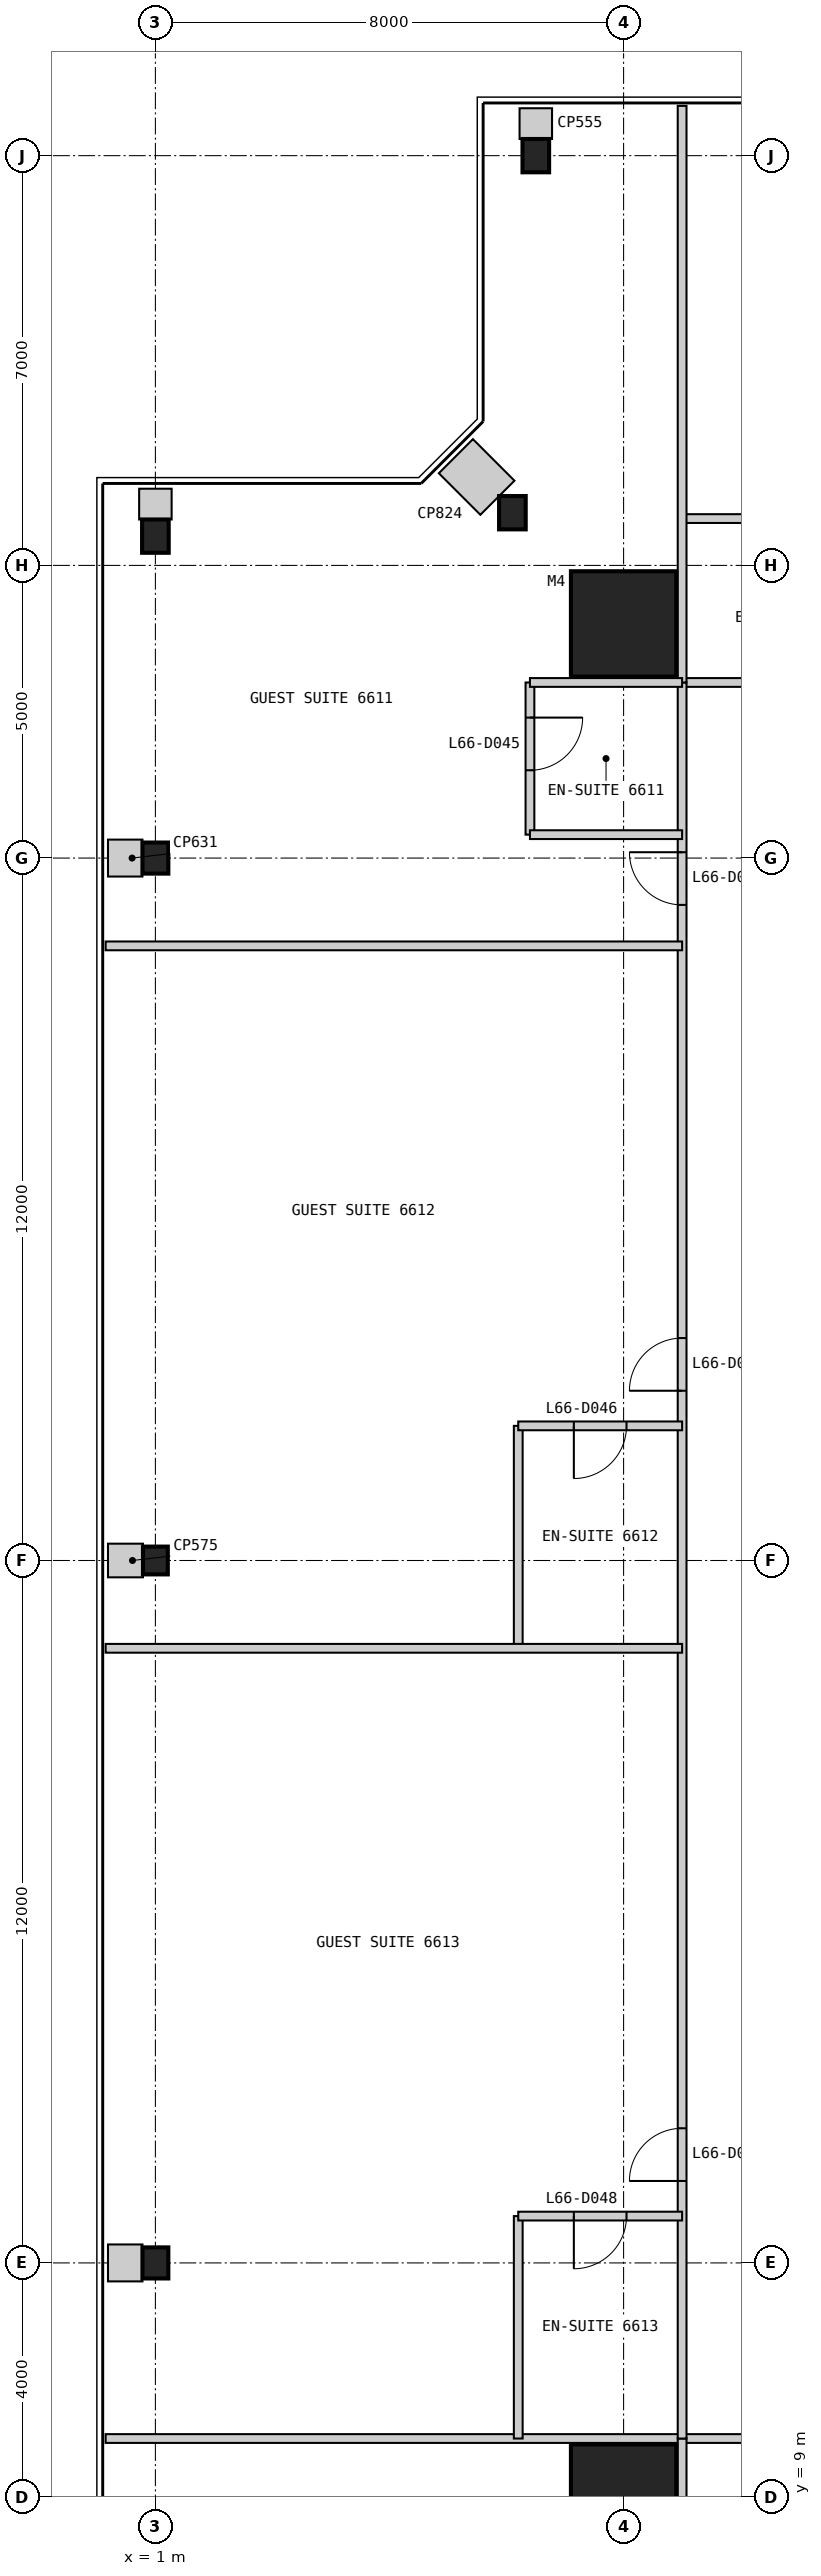
"""IFC4 building model, lengths in metres.
Left out: names, types, materials, properties, quantities, classifications, styles, units other than length and angle.
Written with IfcOpenShell. Run it as: python <this file> out.ifc"""

import sys

from ifc_helpers import new_model, si_unit, direction, frame, frame_2d, origin, origin_2d, place, context, subcontext, project, spatial, rectangle, i_section, extrude, element, fill, save


model = new_model("IFC4")
c1 = context("Model", 3, precision=1e-05, world=origin(), true_north=direction((0.0, 1.0)))
c2 = subcontext(c1, "Body", "Model", "MODEL_VIEW")
j1 = project(units=[si_unit("LENGTHUNIT", "METRE"), si_unit("PLANEANGLEUNIT", "RADIAN")], contexts=[c1])
p1 = place(None, origin())
s1 = spatial("IfcSite", under=j1, at=p1, CompositionType="ELEMENT")
p2 = place(p1, origin())
s2 = spatial("IfcBuilding", under=s1, at=p2, CompositionType="ELEMENT")
p3 = place(p2, frame((0.0, 0.0, 276.4)))
s3 = spatial("IfcBuildingStorey", under=s2, at=p3, CompositionType="ELEMENT", Elevation=276.4)
for number, where, z_axis, x_axis in (
    (1, (9.0, 9.0, 0.0), (0.0, 0.0, 1.0), (1.0, 0.0, 0.0)),
    (2, (9.0, 41.0, 0.0), (0.0, 0.0, 1.0), (1.0, 0.0, 0.0)),
):
    element("IfcColumn", number, at=place(p3, frame(where, z_axis=z_axis, x_axis=x_axis)), inside=s3, PredefinedType="COLUMN", context=c2, shape_type="SweptSolid", body=[
        extrude(rectangle(XDim=1.8, YDim=1.8, at=origin_2d()), origin(), (0.0, 0.0, 1.0), 3.4),
    ])
for number, where, z_axis, x_axis in (
    (3, (7.5, 49.0, 0.0), (0.0, 0.0, 1.0), (1.0, 0.0, 0.0)),
    (4, (7.1, 42.9, 0.0), (0.0, 0.0, 1.0), (1.0, 0.0, 0.0)),
    (5, (1.0, 42.5, 0.0), (0.0, 0.0, 1.0), (1.0, 0.0, 0.0)),
):
    element("IfcColumn", number, at=place(p3, frame(where, z_axis=z_axis, x_axis=x_axis)), inside=s3, PredefinedType="COLUMN", context=c2, shape_type="SweptSolid", body=[
        extrude(i_section(OverallWidth=0.455, OverallDepth=0.569, WebThickness=0.078, FlangeThickness=0.125, at=origin_2d()), origin(), (0.0, 0.0, 1.0), 3.4),
    ])
p4 = place(p3, frame((1.0, 37.0, 0.0), z_axis=(0.0, 0.0, 1.0), x_axis=(1.0, 0.0, 0.0)))
e6 = element("IfcColumn", 6, at=p4, inside=s3, PredefinedType="COLUMN", context=c2, shape_type="SweptSolid", body=[
    extrude(i_section(OverallWidth=0.442, OverallDepth=0.531, WebThickness=0.066, FlangeThickness=0.106, at=origin_2d()), origin(), (0.0, 0.0, 1.0), 3.4),
])
p5 = place(p3, frame((1.0, 25.0, 0.0), z_axis=(0.0, 0.0, 1.0), x_axis=(1.0, 0.0, 0.0)))
e7 = element("IfcColumn", 7, at=p5, inside=s3, PredefinedType="COLUMN", context=c2, shape_type="SweptSolid", body=[
    extrude(i_section(OverallWidth=0.424, OverallDepth=0.475, WebThickness=0.048, FlangeThickness=0.077, at=origin_2d()), origin(), (0.0, 0.0, 1.0), 3.4),
])
p6 = place(p3, frame((1.0, 13.0, 0.0), z_axis=(0.0, 0.0, 1.0), x_axis=(1.0, 0.0, 0.0)))
e8 = element("IfcColumn", 8, at=p6, inside=s3, PredefinedType="COLUMN", context=c2, shape_type="SweptSolid", body=[
    extrude(i_section(OverallWidth=0.442, OverallDepth=0.531, WebThickness=0.066, FlangeThickness=0.106, at=origin_2d()), origin(), (0.0, 0.0, 1.0), 3.4),
])
p7 = place(p3, frame((10.0, 10.0, 0.0), z_axis=(0.0, 0.0, 1.0), x_axis=(1.0, 0.0, 0.0)))
e9 = element("IfcWall", 9, at=p7, inside=s3, PredefinedType="PARTITIONING", context=c2, shape_type="SweptSolid", body=[
    extrude(rectangle(XDim=30.0, YDim=0.15, at=frame_2d((15.0, 0.0))), origin(), (0.0, 0.0, 1.0), 3.25),
])
p8 = place(p7, frame((2.9, 0.0, 0.0)))
e10 = element("IfcOpeningElement", 10, at=p8, cuts=e9, PredefinedType="OPENING", context=c2, shape_type="SweptSolid", body=[
    extrude(rectangle(XDim=0.9, YDim=2.1, at=frame_2d((0.45, 1.05))), frame((0.0, 0.085, 0.0), z_axis=(0.0, -1.0, 0.0), x_axis=(1.0, 0.0, 0.0)), (0.0, 0.0, 1.0), 0.17),
])
p9 = place(p7, frame((11.2, 0.0, 0.0)))
e11 = element("IfcOpeningElement", 11, at=p9, cuts=e9, PredefinedType="OPENING", context=c2, shape_type="SweptSolid", body=[
    extrude(rectangle(XDim=0.9, YDim=2.1, at=frame_2d((0.45, 1.05))), frame((0.0, 0.085, 0.0), z_axis=(0.0, -1.0, 0.0), x_axis=(1.0, 0.0, 0.0)), (0.0, 0.0, 1.0), 0.17),
])
p10 = place(p7, frame((17.6, 0.0, 0.0)))
e12 = element("IfcOpeningElement", 12, at=p10, cuts=e9, PredefinedType="OPENING", context=c2, shape_type="SweptSolid", body=[
    extrude(rectangle(XDim=0.9, YDim=2.1, at=frame_2d((0.45, 1.05))), frame((0.0, 0.085, 0.0), z_axis=(0.0, -1.0, 0.0), x_axis=(1.0, 0.0, 0.0)), (0.0, 0.0, 1.0), 0.17),
])
p11 = place(p7, frame((26.3, 0.0, 0.0)))
e13 = element("IfcOpeningElement", 13, at=p11, cuts=e9, PredefinedType="OPENING", context=c2, shape_type="SweptSolid", body=[
    extrude(rectangle(XDim=1.0, YDim=2.1, at=frame_2d((0.5, 1.05))), frame((0.0, 0.085, 0.0), z_axis=(0.0, -1.0, 0.0), x_axis=(1.0, 0.0, 0.0)), (0.0, 0.0, 1.0), 0.17),
])
p12 = place(p3, frame((0.15, 10.0, 0.0), z_axis=(0.0, 0.0, 1.0), x_axis=(1.0, 0.0, 0.0)))
e14 = element("IfcWall", 14, at=p12, inside=s3, PredefinedType="PARTITIONING", context=c2, shape_type="SweptSolid", body=[
    extrude(rectangle(XDim=9.85, YDim=0.15, at=frame_2d((4.925, 0.0))), origin(), (0.0, 0.0, 1.0), 3.25),
])
p13 = place(p3, frame((10.0, 7.4, 0.0), z_axis=(0.0, 0.0, 1.0), x_axis=(0.0, 1.0, 0.0)))
e15 = element("IfcWall", 15, at=p13, inside=s3, PredefinedType="PARTITIONING", context=c2, shape_type="SweptSolid", body=[
    extrude(rectangle(XDim=2.6, YDim=0.15, at=frame_2d((1.3, 0.0))), origin(), (0.0, 0.0, 1.0), 3.25),
])
p14 = place(p3, frame((40.0, 40.0, 0.0), z_axis=(0.0, 0.0, 1.0), x_axis=(-1.0, 0.0, 0.0)))
e16 = element("IfcWall", 16, at=p14, inside=s3, PredefinedType="PARTITIONING", context=c2, shape_type="SweptSolid", body=[
    extrude(rectangle(XDim=30.0, YDim=0.15, at=frame_2d((15.0, 0.0))), origin(), (0.0, 0.0, 1.0), 3.25),
])
p15 = place(p14, frame((2.9, 0.0, 0.0)))
e17 = element("IfcOpeningElement", 17, at=p15, cuts=e16, PredefinedType="OPENING", context=c2, shape_type="SweptSolid", body=[
    extrude(rectangle(XDim=0.9, YDim=2.1, at=frame_2d((0.45, 1.05))), frame((0.0, 0.085, 0.0), z_axis=(0.0, -1.0, 0.0), x_axis=(1.0, 0.0, 0.0)), (0.0, 0.0, 1.0), 0.17),
])
p16 = place(p14, frame((11.2, 0.0, 0.0)))
e18 = element("IfcOpeningElement", 18, at=p16, cuts=e16, PredefinedType="OPENING", context=c2, shape_type="SweptSolid", body=[
    extrude(rectangle(XDim=0.9, YDim=2.1, at=frame_2d((0.45, 1.05))), frame((0.0, 0.085, 0.0), z_axis=(0.0, -1.0, 0.0), x_axis=(1.0, 0.0, 0.0)), (0.0, 0.0, 1.0), 0.17),
])
p17 = place(p14, frame((24.7, 0.0, 0.0)))
e19 = element("IfcOpeningElement", 19, at=p17, cuts=e16, PredefinedType="OPENING", context=c2, shape_type="SweptSolid", body=[
    extrude(rectangle(XDim=0.9, YDim=2.1, at=frame_2d((0.45, 1.05))), frame((0.0, 0.085, 0.0), z_axis=(0.0, -1.0, 0.0), x_axis=(1.0, 0.0, 0.0)), (0.0, 0.0, 1.0), 0.17),
])
p18 = place(p3, frame((13.8, 42.8, 0.0), z_axis=(0.0, 0.0, 1.0), x_axis=(-1.0, 0.0, 0.0)))
e20 = element("IfcWall", 20, at=p18, inside=s3, PredefinedType="PARTITIONING", context=c2, shape_type="SweptSolid", body=[
    extrude(rectangle(XDim=3.8, YDim=0.15, at=frame_2d((1.9, 0.0))), origin(), (0.0, 0.0, 1.0), 3.25),
])
p19 = place(p3, frame((10.0, 40.0, 0.0), z_axis=(0.0, 0.0, 1.0), x_axis=(0.0, -1.0, 0.0)))
e21 = element("IfcWall", 21, at=p19, inside=s3, PredefinedType="PARTITIONING", context=c2, shape_type="SweptSolid", body=[
    extrude(rectangle(XDim=30.0, YDim=0.15, at=frame_2d((15.0, 0.0))), origin(), (0.0, 0.0, 1.0), 2.638),
])
p20 = place(p19, frame((2.9, 0.0, 0.0)))
e22 = element("IfcOpeningElement", 22, at=p20, cuts=e21, PredefinedType="OPENING", context=c2, shape_type="SweptSolid", body=[
    extrude(rectangle(XDim=0.9, YDim=2.1, at=frame_2d((0.45, 1.05))), frame((0.0, 0.085, 0.0), z_axis=(0.0, -1.0, 0.0), x_axis=(1.0, 0.0, 0.0)), (0.0, 0.0, 1.0), 0.17),
])
p21 = place(p19, frame((11.2, 0.0, 0.0)))
e23 = element("IfcOpeningElement", 23, at=p21, cuts=e21, PredefinedType="OPENING", context=c2, shape_type="SweptSolid", body=[
    extrude(rectangle(XDim=0.9, YDim=2.1, at=frame_2d((0.45, 1.05))), frame((0.0, 0.085, 0.0), z_axis=(0.0, -1.0, 0.0), x_axis=(1.0, 0.0, 0.0)), (0.0, 0.0, 1.0), 0.17),
])
p22 = place(p19, frame((24.7, 0.0, 0.0)))
e24 = element("IfcOpeningElement", 24, at=p22, cuts=e21, PredefinedType="OPENING", context=c2, shape_type="SweptSolid", body=[
    extrude(rectangle(XDim=0.9, YDim=2.1, at=frame_2d((0.45, 1.05))), frame((0.0, 0.085, 0.0), z_axis=(0.0, -1.0, 0.0), x_axis=(1.0, 0.0, 0.0)), (0.0, 0.0, 1.0), 0.17),
])
p23 = place(p3, frame((10.0, 49.85, 0.0), z_axis=(0.0, 0.0, 1.0), x_axis=(0.0, -1.0, 0.0)))
e25 = element("IfcWall", 25, at=p23, inside=s3, PredefinedType="PARTITIONING", context=c2, shape_type="SweptSolid", body=[
    extrude(rectangle(XDim=9.85, YDim=0.15, at=frame_2d((4.925, 0.0))), origin(), (0.0, 0.0, 1.0), 3.25),
])
p24 = place(p3, frame((7.4, 40.0, 0.0), z_axis=(0.0, 0.0, 1.0), x_axis=(0.0, -1.0, 0.0)))
e26 = element("IfcWall", 26, at=p24, inside=s3, PredefinedType="PARTITIONING", context=c2, shape_type="SweptSolid", body=[
    extrude(rectangle(XDim=2.6, YDim=0.15, at=frame_2d((1.3, 0.0))), origin(), (0.0, 0.0, 1.0), 3.25),
])
p25 = place(p24, frame((0.6, 0.0, 0.0)))
e27 = element("IfcOpeningElement", 27, at=p25, cuts=e26, PredefinedType="OPENING", context=c2, shape_type="SweptSolid", body=[
    extrude(rectangle(XDim=0.9, YDim=2.1, at=frame_2d((0.45, 1.05))), frame((0.0, 0.085, 0.0), z_axis=(0.0, -1.0, 0.0), x_axis=(1.0, 0.0, 0.0)), (0.0, 0.0, 1.0), 0.17),
])
for number, where, z_axis, x_axis in (
    (28, (7.4, 40.0, 0.0), (0.0, 0.0, 1.0), (1.0, 0.0, 0.0)),
    (29, (7.4, 37.4, 0.0), (0.0, 0.0, 1.0), (1.0, 0.0, 0.0)),
):
    element("IfcWall", number, at=place(p3, frame(where, z_axis=z_axis, x_axis=x_axis)), inside=s3, PredefinedType="PARTITIONING", context=c2, shape_type="SweptSolid", body=[
        extrude(rectangle(XDim=2.6, YDim=0.15, at=frame_2d((1.3, 0.0))), origin(), (0.0, 0.0, 1.0), 3.25),
    ])
p26 = place(p3, frame((0.15, 35.5, 0.0), z_axis=(0.0, 0.0, 1.0), x_axis=(1.0, 0.0, 0.0)))
e30 = element("IfcWall", 30, at=p26, inside=s3, PredefinedType="PARTITIONING", context=c2, shape_type="SweptSolid", body=[
    extrude(rectangle(XDim=9.85, YDim=0.15, at=frame_2d((4.925, 0.0))), origin(), (0.0, 0.0, 1.0), 3.25),
])
p27 = place(p3, frame((7.2, 27.3, 0.0), z_axis=(0.0, 0.0, 1.0), x_axis=(0.0, -1.0, 0.0)))
e31 = element("IfcWall", 31, at=p27, inside=s3, PredefinedType="PARTITIONING", context=c2, shape_type="SweptSolid", body=[
    extrude(rectangle(XDim=3.8, YDim=0.15, at=frame_2d((1.9, 0.0))), origin(), (0.0, 0.0, 1.0), 3.25),
])
p28 = place(p3, frame((7.2, 27.3, 0.0), z_axis=(0.0, 0.0, 1.0), x_axis=(1.0, 0.0, 0.0)))
e32 = element("IfcWall", 32, at=p28, inside=s3, PredefinedType="PARTITIONING", context=c2, shape_type="SweptSolid", body=[
    extrude(rectangle(XDim=2.8, YDim=0.15, at=frame_2d((1.4, 0.0))), origin(), (0.0, 0.0, 1.0), 3.25),
])
p29 = place(p28, frame((0.95, 0.0, 0.0)))
e33 = element("IfcOpeningElement", 33, at=p29, cuts=e32, PredefinedType="OPENING", context=c2, shape_type="SweptSolid", body=[
    extrude(rectangle(XDim=0.9, YDim=2.1, at=frame_2d((0.45, 1.05))), frame((0.0, 0.085, 0.0), z_axis=(0.0, -1.0, 0.0), x_axis=(1.0, 0.0, 0.0)), (0.0, 0.0, 1.0), 0.17),
])
p30 = place(p3, frame((0.15, 23.5, 0.0), z_axis=(0.0, 0.0, 1.0), x_axis=(1.0, 0.0, 0.0)))
e34 = element("IfcWall", 34, at=p30, inside=s3, PredefinedType="PARTITIONING", context=c2, shape_type="SweptSolid", body=[
    extrude(rectangle(XDim=9.85, YDim=0.15, at=frame_2d((4.925, 0.0))), origin(), (0.0, 0.0, 1.0), 3.25),
])
p31 = place(p3, frame((7.2, 13.8, 0.0), z_axis=(0.0, 0.0, 1.0), x_axis=(0.0, -1.0, 0.0)))
e35 = element("IfcWall", 35, at=p31, inside=s3, PredefinedType="PARTITIONING", context=c2, shape_type="SweptSolid", body=[
    extrude(rectangle(XDim=3.8, YDim=0.15, at=frame_2d((1.9, 0.0))), origin(), (0.0, 0.0, 1.0), 3.25),
])
p32 = place(p3, frame((7.2, 13.8, 0.0), z_axis=(0.0, 0.0, 1.0), x_axis=(1.0, 0.0, 0.0)))
e36 = element("IfcWall", 36, at=p32, inside=s3, PredefinedType="PARTITIONING", context=c2, shape_type="SweptSolid", body=[
    extrude(rectangle(XDim=2.8, YDim=0.15, at=frame_2d((1.4, 0.0))), origin(), (0.0, 0.0, 1.0), 3.25),
])
p33 = place(p32, frame((0.95, 0.0, 0.0)))
e37 = element("IfcOpeningElement", 37, at=p33, cuts=e36, PredefinedType="OPENING", context=c2, shape_type="SweptSolid", body=[
    extrude(rectangle(XDim=0.9, YDim=2.1, at=frame_2d((0.45, 1.05))), frame((0.0, 0.085, 0.0), z_axis=(0.0, -1.0, 0.0), x_axis=(1.0, 0.0, 0.0)), (0.0, 0.0, 1.0), 0.17),
])
p34 = place(p3, frame((7.5, 49.81, 0.0), z_axis=(0.0, 0.0, 1.0), x_axis=(0.0, -1.0, 0.0)))
e38 = element("IfcWall", 38, at=p34, inside=s3, PredefinedType="PARTITIONING", context=c2, shape_type="SweptSolid", body=[
    extrude(rectangle(XDim=0.526, YDim=0.555, at=frame_2d((0.263, 0.0))), origin(), (0.0, 0.0, 1.0), 3.25),
])
p35 = place(p3, frame((6.134, 43.866, 0.0), z_axis=(0.0, 0.0, 1.0), x_axis=(0.707106781187, -0.707106781187, 0.0)))
e39 = element("IfcWall", 39, at=p35, inside=s3, PredefinedType="PARTITIONING", context=c2, shape_type="SweptSolid", body=[
    extrude(rectangle(XDim=1.004, YDim=0.824, at=frame_2d((0.502, 0.0))), origin(), (0.0, 0.0, 1.0), 3.25),
])
p36 = place(p3, frame((1.0, 43.31, 0.0), z_axis=(0.0, 0.0, 1.0), x_axis=(0.0, -1.0, 0.0)))
e40 = element("IfcWall", 40, at=p36, inside=s3, PredefinedType="PARTITIONING", context=c2, shape_type="SweptSolid", body=[
    extrude(rectangle(XDim=0.526, YDim=0.555, at=frame_2d((0.263, 0.0))), origin(), (0.0, 0.0, 1.0), 3.25),
])
p37 = place(p3, frame((0.19, 37.0, 0.0), z_axis=(0.0, 0.0, 1.0), x_axis=(1.0, 0.0, 0.0)))
e41 = element("IfcWall", 41, at=p37, inside=s3, PredefinedType="PARTITIONING", context=c2, shape_type="SweptSolid", body=[
    extrude(rectangle(XDim=0.589, YDim=0.631, at=frame_2d((0.294, 0.0))), origin(), (0.0, 0.0, 1.0), 3.25),
])
p38 = place(p3, frame((0.19, 25.0, 0.0), z_axis=(0.0, 0.0, 1.0), x_axis=(1.0, 0.0, 0.0)))
e42 = element("IfcWall", 42, at=p38, inside=s3, PredefinedType="PARTITIONING", context=c2, shape_type="SweptSolid", body=[
    extrude(rectangle(XDim=0.598, YDim=0.575, at=frame_2d((0.299, 0.0))), origin(), (0.0, 0.0, 1.0), 3.25),
])
p39 = place(p3, frame((0.19, 13.0, 0.0), z_axis=(0.0, 0.0, 1.0), x_axis=(1.0, 0.0, 0.0)))
e43 = element("IfcWall", 43, at=p39, inside=s3, PredefinedType="PARTITIONING", context=c2, shape_type="SweptSolid", body=[
    extrude(rectangle(XDim=0.589, YDim=0.631, at=frame_2d((0.294, 0.0))), origin(), (0.0, 0.0, 1.0), 3.25),
])
p40 = place(p20, frame((0.9, 0.0, 0.0), z_axis=(0.0, 0.0, 1.0), x_axis=(-1.0, 0.0, 0.0)))
e44 = element("IfcDoor", 44, at=p40, inside=s3, OperationType="SINGLE_SWING_RIGHT", PredefinedType="DOOR", context=c2, shape_type="SweptSolid", body=[
    extrude(rectangle(XDim=0.9, YDim=2.1, at=frame_2d((0.45, 1.05))), frame((0.0, 0.025, 0.0), z_axis=(0.0, -1.0, 0.0), x_axis=(1.0, 0.0, 0.0)), (0.0, 0.0, 1.0), 0.05),
])
fill(e22, e44)
p41 = place(p25, origin())
e45 = element("IfcDoor", 45, at=p41, inside=s3, OperationType="SINGLE_SWING_LEFT", PredefinedType="DOOR", context=c2, shape_type="SweptSolid", body=[
    extrude(rectangle(XDim=0.9, YDim=2.1, at=frame_2d((0.45, 1.05))), frame((0.0, 0.025, 0.0), z_axis=(0.0, -1.0, 0.0), x_axis=(1.0, 0.0, 0.0)), (0.0, 0.0, 1.0), 0.05),
])
fill(e27, e45)
p42 = place(p29, frame((0.9, 0.0, 0.0), z_axis=(0.0, 0.0, 1.0), x_axis=(-1.0, 0.0, 0.0)))
e46 = element("IfcDoor", 46, at=p42, inside=s3, OperationType="SINGLE_SWING_RIGHT", PredefinedType="DOOR", context=c2, shape_type="SweptSolid", body=[
    extrude(rectangle(XDim=0.9, YDim=2.1, at=frame_2d((0.45, 1.05))), frame((0.0, 0.025, 0.0), z_axis=(0.0, -1.0, 0.0), x_axis=(1.0, 0.0, 0.0)), (0.0, 0.0, 1.0), 0.05),
])
fill(e33, e46)
p43 = place(p21, frame((0.9, 0.0, 0.0), z_axis=(0.0, 0.0, 1.0), x_axis=(-1.0, 0.0, 0.0)))
e47 = element("IfcDoor", 47, at=p43, inside=s3, OperationType="SINGLE_SWING_LEFT", PredefinedType="DOOR", context=c2, shape_type="SweptSolid", body=[
    extrude(rectangle(XDim=0.9, YDim=2.1, at=frame_2d((0.45, 1.05))), frame((0.0, 0.025, 0.0), z_axis=(0.0, -1.0, 0.0), x_axis=(1.0, 0.0, 0.0)), (0.0, 0.0, 1.0), 0.05),
])
fill(e23, e47)
p44 = place(p33, frame((0.9, 0.0, 0.0), z_axis=(0.0, 0.0, 1.0), x_axis=(-1.0, 0.0, 0.0)))
e48 = element("IfcDoor", 48, at=p44, inside=s3, OperationType="SINGLE_SWING_RIGHT", PredefinedType="DOOR", context=c2, shape_type="SweptSolid", body=[
    extrude(rectangle(XDim=0.9, YDim=2.1, at=frame_2d((0.45, 1.05))), frame((0.0, 0.025, 0.0), z_axis=(0.0, -1.0, 0.0), x_axis=(1.0, 0.0, 0.0)), (0.0, 0.0, 1.0), 0.05),
])
fill(e37, e48)
p45 = place(p22, frame((0.9, 0.0, 0.0), z_axis=(0.0, 0.0, 1.0), x_axis=(-1.0, 0.0, 0.0)))
e49 = element("IfcDoor", 49, at=p45, inside=s3, OperationType="SINGLE_SWING_LEFT", PredefinedType="DOOR", context=c2, shape_type="SweptSolid", body=[
    extrude(rectangle(XDim=0.9, YDim=2.1, at=frame_2d((0.45, 1.05))), frame((0.0, 0.025, 0.0), z_axis=(0.0, -1.0, 0.0), x_axis=(1.0, 0.0, 0.0)), (0.0, 0.0, 1.0), 0.05),
])
fill(e24, e49)
save(model, sys.argv[1])
